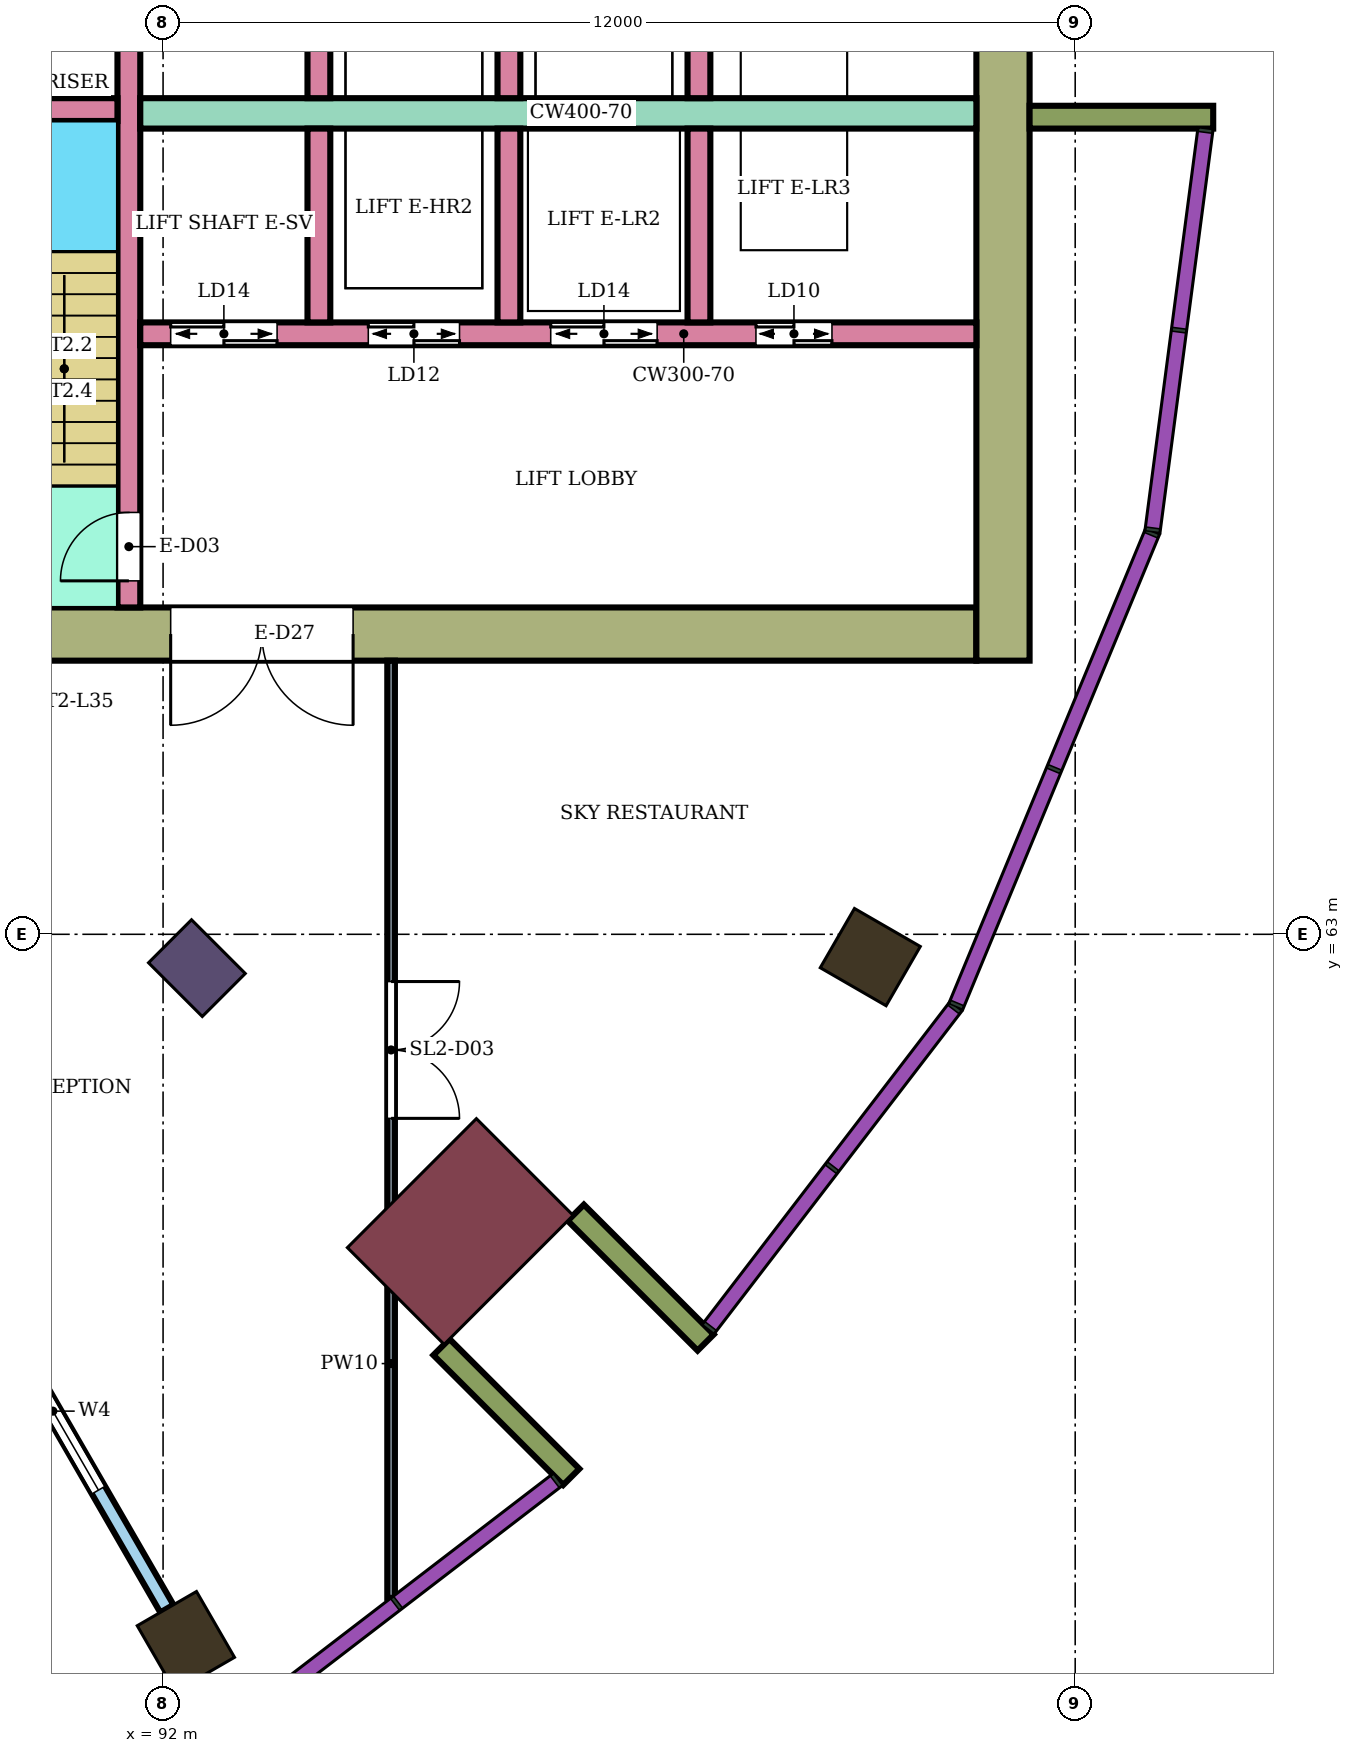
"""IFC4 building model, lengths in metres.
Left out: names, types, materials, properties, quantities, classifications, styles, units other than length and angle.
Written with IfcOpenShell. Run it as: python <this file> out.ifc"""

import sys

from ifc_helpers import new_model, si_unit, direction, frame, frame_2d, origin, origin_2d, place, context, subcontext, project, spatial, rectangle, extrude, element, fill, save


model = new_model("IFC4")
c1 = context("Model", 3, precision=1e-05, world=origin(), true_north=direction((0.0, 1.0)))
c2 = subcontext(c1, "Body", "Model", "MODEL_VIEW")
j1 = project(units=[si_unit("LENGTHUNIT", "METRE"), si_unit("PLANEANGLEUNIT", "RADIAN")], contexts=[c1])
p1 = place(None, origin())
s1 = spatial("IfcSite", under=j1, at=p1, CompositionType="ELEMENT")
p2 = place(p1, origin())
s2 = spatial("IfcBuilding", under=s1, at=p2, CompositionType="ELEMENT")
p3 = place(p2, frame((0.0, 0.0, 149.7)))
s3 = spatial("IfcBuildingStorey", under=s2, at=p3, CompositionType="ELEMENT", Elevation=149.7)
for number, where, z_axis, x_axis in (
    (1, (92.3, 53.696, 0.0), (0.0, 0.0, 1.0), (0.5, -0.866, 0.0)),
    (2, (101.304, 62.7, 0.0), (0.0, 0.0, 1.0), (0.866, -0.5, 0.0)),
):
    element("IfcColumn", number, at=place(p3, frame(where, z_axis=z_axis, x_axis=x_axis)), inside=s3, PredefinedType="COLUMN", context=c2, shape_type="SweptSolid", body=[
        extrude(rectangle(XDim=1.0, YDim=0.9, at=origin_2d()), origin(), (0.0, 0.0, 1.0), 8.0),
    ])
p4 = place(p3, frame((92.445, 62.555, 0.0), z_axis=(0.0, 0.0, 1.0), x_axis=(0.707106781187, -0.707106781187, 0.0)))
e3 = element("IfcColumn", 3, at=p4, inside=s3, PredefinedType="COLUMN", context=c2, shape_type="SweptSolid", body=[
    extrude(rectangle(XDim=1.0, YDim=0.8, at=origin_2d()), origin(), (0.0, 0.0, 1.0), 8.0),
])
p5 = place(p3, frame((95.91, 59.09, 0.0), z_axis=(0.0, 0.0, 1.0), x_axis=(0.707106781187, -0.707106781187, 0.0)))
e4 = element("IfcColumn", 4, at=p5, inside=s3, PredefinedType="COLUMN", context=c2, shape_type="SweptSolid", body=[
    extrude(rectangle(XDim=1.8, YDim=2.4, at=origin_2d()), origin(), (0.0, 0.0, 1.0), 8.0),
])
p6 = place(p3, frame((87.9, 66.95, 0.0), z_axis=(0.0, 0.0, 1.0), x_axis=(1.0, 0.0, 0.0)))
e5 = element("IfcWall", 5, at=p6, inside=s3, PredefinedType="SHEAR", context=c2, shape_type="SweptSolid", body=[
    extrude(rectangle(XDim=14.8, YDim=0.7, at=frame_2d((7.4, 0.0))), origin(), (0.0, 0.0, 1.0), 7.68),
])
p7 = place(p6, frame((4.2, 0.0, 0.0)))
e6 = element("IfcOpeningElement", 6, at=p7, cuts=e5, PredefinedType="OPENING", context=c2, shape_type="SweptSolid", body=[
    extrude(rectangle(XDim=2.4, YDim=2.4, at=frame_2d((1.2, 1.2))), frame((0.0, 0.36, 0.0), z_axis=(0.0, -1.0, 0.0), x_axis=(1.0, 0.0, 0.0)), (0.0, 0.0, 1.0), 0.72),
])
p8 = place(p3, frame((103.05, 66.6, 0.0), z_axis=(0.0, 0.0, 1.0), x_axis=(0.0, 1.0, 0.0)))
e7 = element("IfcWall", 7, at=p8, inside=s3, PredefinedType="SHEAR", context=c2, shape_type="SweptSolid", body=[
    extrude(rectangle(XDim=16.8, YDim=0.7, at=frame_2d((8.4, 0.0))), origin(), (0.0, 0.0, 1.0), 7.68),
])
p9 = place(p3, frame((91.55, 67.3, 0.0), z_axis=(0.0, 0.0, 1.0), x_axis=(0.0, 1.0, 0.0)))
e8 = element("IfcWall", 8, at=p9, inside=s3, PredefinedType="SHEAR", context=c2, shape_type="SweptSolid", body=[
    extrude(rectangle(XDim=7.7, YDim=0.3, at=frame_2d((3.85, 0.0))), origin(), (0.0, 0.0, 1.0), 7.68),
])
p10 = place(p9, frame((0.35, 0.0, 0.0)))
e9 = element("IfcOpeningElement", 9, at=p10, cuts=e8, PredefinedType="OPENING", context=c2, shape_type="SweptSolid", body=[
    extrude(rectangle(XDim=0.9, YDim=2.1, at=frame_2d((0.45, 1.05))), frame((0.0, 0.16, 0.0), z_axis=(0.0, -1.0, 0.0), x_axis=(1.0, 0.0, 0.0)), (0.0, 0.0, 1.0), 0.32),
])
p11 = place(p3, frame((88.35, 73.85, 0.0), z_axis=(0.0, 0.0, 1.0), x_axis=(1.0, 0.0, 0.0)))
e10 = element("IfcWall", 10, at=p11, inside=s3, PredefinedType="SHEAR", context=c2, shape_type="SweptSolid", body=[
    extrude(rectangle(XDim=3.05, YDim=0.3, at=frame_2d((1.525, 0.0))), origin(), (0.0, 0.0, 1.0), 7.68),
])
p12 = place(p3, frame((91.7, 73.8, 0.0), z_axis=(0.0, 0.0, 1.0), x_axis=(1.0, 0.0, 0.0)))
e11 = element("IfcWall", 11, at=p12, inside=s3, PredefinedType="SHEAR", context=c2, shape_type="SweptSolid", body=[
    extrude(rectangle(XDim=11.0, YDim=0.4, at=frame_2d((5.5, 0.0))), origin(), (0.0, 0.0, 1.0), 7.68),
])
p13 = place(p3, frame((91.7, 70.9, 0.0), z_axis=(0.0, 0.0, 1.0), x_axis=(1.0, 0.0, 0.0)))
e12 = element("IfcWall", 12, at=p13, inside=s3, PredefinedType="SHEAR", context=c2, shape_type="SweptSolid", body=[
    extrude(rectangle(XDim=11.0, YDim=0.3, at=frame_2d((5.5, 0.0))), origin(), (0.0, 0.0, 1.0), 7.68),
])
p14 = place(p13, frame((0.4, 0.0, 0.0)))
e13 = element("IfcOpeningElement", 13, at=p14, cuts=e12, PredefinedType="OPENING", context=c2, shape_type="SweptSolid", body=[
    extrude(rectangle(XDim=1.4, YDim=2.1, at=frame_2d((0.7, 1.05))), frame((0.0, 0.16, 0.0), z_axis=(0.0, -1.0, 0.0), x_axis=(1.0, 0.0, 0.0)), (0.0, 0.0, 1.0), 0.32),
])
p15 = place(p13, frame((3.0, 0.0, 0.0)))
e14 = element("IfcOpeningElement", 14, at=p15, cuts=e12, PredefinedType="OPENING", context=c2, shape_type="SweptSolid", body=[
    extrude(rectangle(XDim=1.2, YDim=2.1, at=frame_2d((0.6, 1.05))), frame((0.0, 0.16, 0.0), z_axis=(0.0, -1.0, 0.0), x_axis=(1.0, 0.0, 0.0)), (0.0, 0.0, 1.0), 0.32),
])
p16 = place(p13, frame((5.4, 0.0, 0.0)))
e15 = element("IfcOpeningElement", 15, at=p16, cuts=e12, PredefinedType="OPENING", context=c2, shape_type="SweptSolid", body=[
    extrude(rectangle(XDim=1.4, YDim=2.1, at=frame_2d((0.7, 1.05))), frame((0.0, 0.16, 0.0), z_axis=(0.0, -1.0, 0.0), x_axis=(1.0, 0.0, 0.0)), (0.0, 0.0, 1.0), 0.32),
])
p17 = place(p13, frame((8.1, 0.0, 0.0)))
e16 = element("IfcOpeningElement", 16, at=p17, cuts=e12, PredefinedType="OPENING", context=c2, shape_type="SweptSolid", body=[
    extrude(rectangle(XDim=1.0, YDim=2.1, at=frame_2d((0.5, 1.05))), frame((0.0, 0.16, 0.0), z_axis=(0.0, -1.0, 0.0), x_axis=(1.0, 0.0, 0.0)), (0.0, 0.0, 1.0), 0.32),
])
for number, where, z_axis, x_axis in (
    (17, (94.05, 74.0, 0.0), (0.0, 0.0, 1.0), (0.0, 1.0, 0.0)),
    (18, (96.55, 74.0, 0.0), (0.0, 0.0, 1.0), (0.0, 1.0, 0.0)),
    (19, (99.05, 74.0, 0.0), (0.0, 0.0, 1.0), (0.0, 1.0, 0.0)),
    (20, (94.05, 71.05, 0.0), (0.0, 0.0, 1.0), (0.0, 1.0, 0.0)),
    (21, (96.55, 71.05, 0.0), (0.0, 0.0, 1.0), (0.0, 1.0, 0.0)),
    (22, (99.05, 71.05, 0.0), (0.0, 0.0, 1.0), (0.0, 1.0, 0.0)),
):
    element("IfcWall", number, at=place(p3, frame(where, z_axis=z_axis, x_axis=x_axis)), inside=s3, PredefinedType="SHEAR", context=c2, shape_type="SweptSolid", body=[
        extrude(rectangle(XDim=2.55, YDim=0.3, at=frame_2d((1.275, 0.0))), origin(), (0.0, 0.0, 1.0), 7.68),
    ])
for number, where, z_axis, x_axis in (
    (23, (103.4, 73.75, 0.0), (0.0, 0.0, 1.0), (1.0, 0.0, 0.0)),
    (24, (95.662, 57.57, 0.0), (0.0, 0.0, 1.0), (0.707, -0.707, 0.0)),
    (25, (97.43, 59.338, 0.0), (0.0, 0.0, 1.0), (0.707, -0.707, 0.0)),
):
    element("IfcWall", number, at=place(p3, frame(where, z_axis=z_axis, x_axis=x_axis)), inside=s3, PredefinedType="NOTDEFINED", context=c2, shape_type="SweptSolid", body=[
        extrude(rectangle(XDim=2.416, YDim=0.3, at=frame_2d((1.208, 0.0))), origin(), (0.0, 0.0, 1.0), 8.0),
    ])
p18 = place(p3, frame((89.05, 59.325, 0.0), z_axis=(0.0, 0.0, 1.0), x_axis=(0.500007758305, -0.866020924479, 0.0)))
e26 = element("IfcWall", 26, at=p18, inside=s3, PredefinedType="NOTDEFINED", context=c2, shape_type="SweptSolid", body=[
    extrude(rectangle(XDim=6.0, YDim=0.2, at=frame_2d((3.0, 0.0))), origin(), (0.0, 0.0, 1.0), 8.0),
])
p19 = place(p18, frame((1.8, 0.0, 0.3)))
e27 = element("IfcOpeningElement", 27, at=p19, cuts=e26, PredefinedType="OPENING", context=c2, shape_type="SweptSolid", body=[
    extrude(rectangle(XDim=2.4, YDim=3.6, at=frame_2d((1.2, 1.8))), frame((0.0, 0.11, 0.0), z_axis=(0.0, -1.0, 0.0), x_axis=(1.0, 0.0, 0.0)), (0.0, 0.0, 1.0), 0.22),
])
p20 = place(p3, frame((95.0, 54.27, 0.0), z_axis=(0.0, 0.0, 1.0), x_axis=(0.0, 1.0, 0.0)))
e28 = element("IfcWall", 28, at=p20, inside=s3, PredefinedType="PARTITIONING", context=c2, shape_type="SweptSolid", body=[
    extrude(rectangle(XDim=12.33, YDim=0.1, at=frame_2d((6.165, 0.0))), origin(), (0.0, 0.0, 1.0), 7.55),
])
p21 = place(p20, frame((6.309, 0.0, 0.0)))
e29 = element("IfcOpeningElement", 29, at=p21, cuts=e28, PredefinedType="OPENING", context=c2, shape_type="SweptSolid", body=[
    extrude(rectangle(XDim=1.8, YDim=2.1, at=frame_2d((0.9, 1.05))), frame((0.0, 0.06, 0.0), z_axis=(0.0, -1.0, 0.0), x_axis=(1.0, 0.0, 0.0)), (0.0, 0.0, 1.0), 0.12),
])
p22 = place(p19, origin())
e30 = element("IfcWindow", 30, at=p22, inside=s3, PartitioningType="SINGLE_PANEL", PredefinedType="WINDOW", context=c2, shape_type="SweptSolid", body=[
    extrude(rectangle(XDim=2.4, YDim=3.6, at=frame_2d((1.2, 1.8))), frame((0.0, 0.03, 0.0), z_axis=(0.0, -1.0, 0.0), x_axis=(1.0, 0.0, 0.0)), (0.0, 0.0, 1.0), 0.06),
])
fill(e27, e30)
p23 = place(p21, frame((1.8, 0.0, 0.0), z_axis=(0.0, 0.0, 1.0), x_axis=(-1.0, 0.0, 0.0)))
e31 = element("IfcDoor", 31, at=p23, inside=s3, OperationType="DOUBLE_DOOR_SINGLE_SWING", PredefinedType="DOOR", context=c2, shape_type="SweptSolid", body=[
    extrude(rectangle(XDim=1.8, YDim=2.1, at=frame_2d((0.9, 1.05))), frame((0.0, 0.025, 0.0), z_axis=(0.0, -1.0, 0.0), x_axis=(1.0, 0.0, 0.0)), (0.0, 0.0, 1.0), 0.05),
])
fill(e29, e31)
p24 = place(p10, origin())
e32 = element("IfcDoor", 32, at=p24, inside=s3, OperationType="SINGLE_SWING_LEFT", PredefinedType="DOOR", context=c2, shape_type="SweptSolid", body=[
    extrude(rectangle(XDim=0.9, YDim=2.1, at=frame_2d((0.45, 1.05))), frame((0.0, 0.025, 0.0), z_axis=(0.0, -1.0, 0.0), x_axis=(1.0, 0.0, 0.0)), (0.0, 0.0, 1.0), 0.05),
])
fill(e9, e32)
p25 = place(p14, origin())
e33 = element("IfcDoor", 33, at=p25, inside=s3, OperationType="DOUBLE_DOOR_SLIDING", PredefinedType="DOOR", context=c2, shape_type="SweptSolid", body=[
    extrude(rectangle(XDim=1.4, YDim=2.1, at=frame_2d((0.7, 1.05))), frame((0.0, 0.025, 0.0), z_axis=(0.0, -1.0, 0.0), x_axis=(1.0, 0.0, 0.0)), (0.0, 0.0, 1.0), 0.05),
])
fill(e13, e33)
p26 = place(p15, origin())
e34 = element("IfcDoor", 34, at=p26, inside=s3, OperationType="DOUBLE_DOOR_SLIDING", PredefinedType="DOOR", context=c2, shape_type="SweptSolid", body=[
    extrude(rectangle(XDim=1.2, YDim=2.1, at=frame_2d((0.6, 1.05))), frame((0.0, 0.025, 0.0), z_axis=(0.0, -1.0, 0.0), x_axis=(1.0, 0.0, 0.0)), (0.0, 0.0, 1.0), 0.05),
])
fill(e14, e34)
p27 = place(p16, origin())
e35 = element("IfcDoor", 35, at=p27, inside=s3, OperationType="DOUBLE_DOOR_SLIDING", PredefinedType="DOOR", context=c2, shape_type="SweptSolid", body=[
    extrude(rectangle(XDim=1.4, YDim=2.1, at=frame_2d((0.7, 1.05))), frame((0.0, 0.025, 0.0), z_axis=(0.0, -1.0, 0.0), x_axis=(1.0, 0.0, 0.0)), (0.0, 0.0, 1.0), 0.05),
])
fill(e15, e35)
p28 = place(p17, origin())
e36 = element("IfcDoor", 36, at=p28, inside=s3, OperationType="DOUBLE_DOOR_SLIDING", PredefinedType="DOOR", context=c2, shape_type="SweptSolid", body=[
    extrude(rectangle(XDim=1.0, YDim=2.1, at=frame_2d((0.5, 1.05))), frame((0.0, 0.025, 0.0), z_axis=(0.0, -1.0, 0.0), x_axis=(1.0, 0.0, 0.0)), (0.0, 0.0, 1.0), 0.05),
])
fill(e16, e36)
p29 = place(p7, frame((2.4, 0.0, 0.0), z_axis=(0.0, 0.0, 1.0), x_axis=(-1.0, 0.0, 0.0)))
e37 = element("IfcDoor", 37, at=p29, inside=s3, OperationType="DOUBLE_DOOR_SINGLE_SWING", PredefinedType="DOOR", context=c2, shape_type="SweptSolid", body=[
    extrude(rectangle(XDim=2.4, YDim=2.4, at=frame_2d((1.2, 1.2))), frame((0.0, 0.025, 0.0), z_axis=(0.0, -1.0, 0.0), x_axis=(1.0, 0.0, 0.0)), (0.0, 0.0, 1.0), 0.05),
])
fill(e6, e37)
save(model, sys.argv[1])
